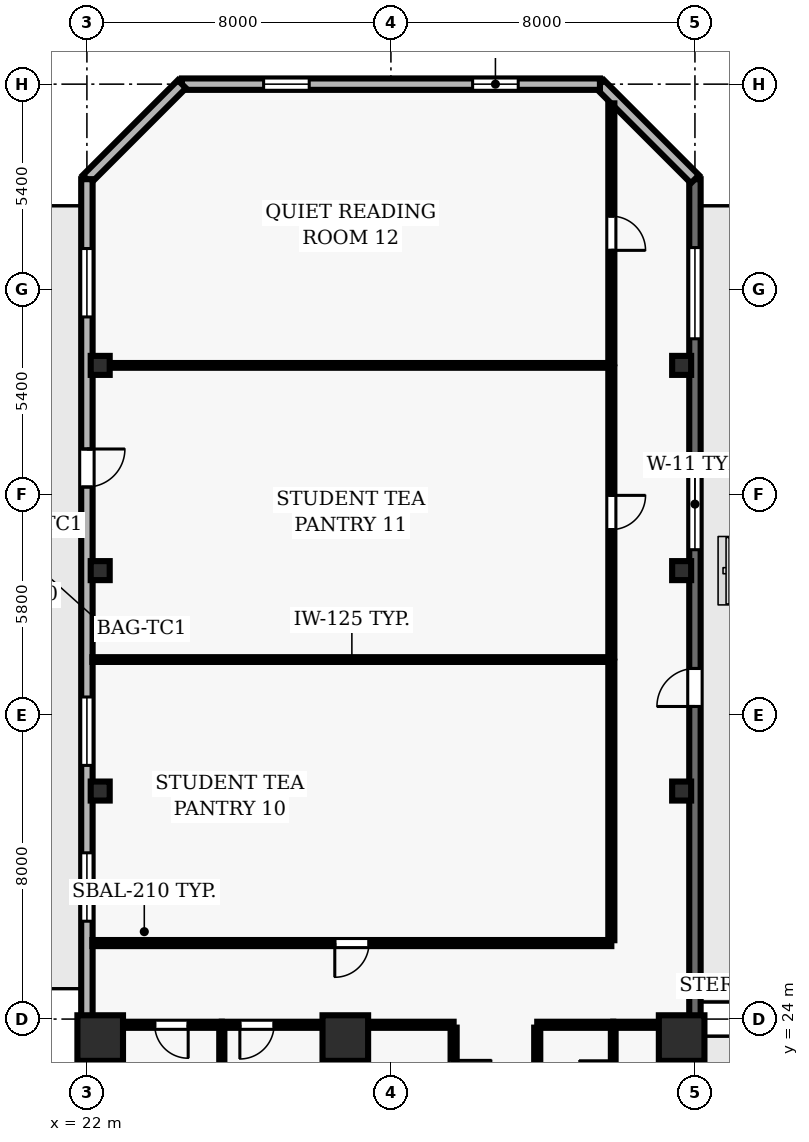
"""IFC4 building model, lengths in metres.
Left out: names, types, materials, properties, quantities, classifications, styles, units other than length and angle.
Written with IfcOpenShell. Run it as: python <this file> out.ifc"""

import sys

from ifc_helpers import new_model, si_unit, direction, frame, frame_2d, origin, origin_2d, place, context, subcontext, project, spatial, rectangle, hollow_rectangle, extrude, element, fill, save


model = new_model("IFC4")
c1 = context("Model", 3, precision=1e-05, world=origin(), true_north=direction((0.0, 1.0)))
c2 = subcontext(c1, "Body", "Model", "MODEL_VIEW")
j1 = project(units=[si_unit("LENGTHUNIT", "METRE"), si_unit("PLANEANGLEUNIT", "RADIAN")], contexts=[c1])
p1 = place(None, origin())
s1 = spatial("IfcSite", under=j1, at=p1, CompositionType="ELEMENT")
p2 = place(p1, origin())
s2 = spatial("IfcBuilding", under=s1, at=p2, CompositionType="ELEMENT")
p3 = place(p2, frame((0.0, 0.0, 158.0)))
s3 = spatial("IfcBuildingStorey", under=s2, at=p3, CompositionType="ELEMENT", Elevation=158.0)
for number, where, z_axis, x_axis in (
    (1, (22.35, 23.5, 0.0), (0.0, 0.0, 1.0), (1.0, 0.0, 0.0)),
    (2, (28.8, 23.5, 0.0), (0.0, 0.0, 1.0), (1.0, 0.0, 0.0)),
    (3, (37.65, 23.5, 0.0), (0.0, 0.0, 1.0), (1.0, 0.0, 0.0)),
):
    element("IfcColumn", number, at=place(p3, frame(where, z_axis=z_axis, x_axis=x_axis)), inside=s3, PredefinedType="COLUMN", context=c2, shape_type="SweptSolid", body=[
        extrude(rectangle(XDim=1.2, YDim=1.2, at=origin_2d()), origin(), (0.0, 0.0, 1.0), 3.9),
    ])
for number, where, z_axis, x_axis in (
    (4, (22.35, 30.0, 0.0), (0.0, 0.0, 1.0), (1.0, 0.0, 0.0)),
    (5, (37.65, 30.0, 0.0), (0.0, 0.0, 1.0), (1.0, 0.0, 0.0)),
    (6, (22.35, 35.8, 0.0), (0.0, 0.0, 1.0), (1.0, 0.0, 0.0)),
    (7, (37.65, 35.8, 0.0), (0.0, 0.0, 1.0), (1.0, 0.0, 0.0)),
    (8, (22.35, 41.2, 0.0), (0.0, 0.0, 1.0), (1.0, 0.0, 0.0)),
    (9, (37.65, 41.2, 0.0), (0.0, 0.0, 1.0), (1.0, 0.0, 0.0)),
):
    element("IfcColumn", number, at=place(p3, frame(where, z_axis=z_axis, x_axis=x_axis)), inside=s3, PredefinedType="COLUMN", context=c2, shape_type="SweptSolid", body=[
        extrude(hollow_rectangle(XDim=0.5, YDim=0.5, WallThickness=0.025, at=origin_2d()), origin(), (0.0, 0.0, 1.0), 3.9),
    ])
p4 = place(p3, frame((38.0, 22.1, 0.0), z_axis=(0.0, 0.0, 1.0), x_axis=(0.0, 1.0, 0.0)))
e10 = element("IfcWall", 10, at=p4, inside=s3, PredefinedType="SOLIDWALL", context=c2, shape_type="SweptSolid", body=[
    extrude(rectangle(XDim=24.0, YDim=0.3, at=frame_2d((12.0, 0.0))), origin(), (0.0, 0.0, 1.0), 3.69),
])
p5 = place(p4, frame((10.125, 0.0, 0.0)))
e11 = element("IfcOpeningElement", 11, at=p5, cuts=e10, PredefinedType="OPENING", context=c2, shape_type="SweptSolid", body=[
    extrude(rectangle(XDim=1.0, YDim=2.2, at=frame_2d((0.5, 1.1))), frame((0.0, 0.16, 0.0), z_axis=(0.0, -1.0, 0.0), x_axis=(1.0, 0.0, 0.0)), (0.0, 0.0, 1.0), 0.32),
])
p6 = place(p4, frame((14.25, 0.0, 0.9)))
e12 = element("IfcOpeningElement", 12, at=p6, cuts=e10, PredefinedType="OPENING", context=c2, shape_type="SweptSolid", body=[
    extrude(rectangle(XDim=2.4, YDim=2.2, at=frame_2d((1.2, 1.1))), frame((0.0, 0.16, 0.0), z_axis=(0.0, -1.0, 0.0), x_axis=(1.0, 0.0, 0.0)), (0.0, 0.0, 1.0), 0.32),
])
p7 = place(p4, frame((19.8, 0.0, 0.9)))
e13 = element("IfcOpeningElement", 13, at=p7, cuts=e10, PredefinedType="OPENING", context=c2, shape_type="SweptSolid", body=[
    extrude(rectangle(XDim=2.4, YDim=2.2, at=frame_2d((1.2, 1.1))), frame((0.0, 0.16, 0.0), z_axis=(0.0, -1.0, 0.0), x_axis=(1.0, 0.0, 0.0)), (0.0, 0.0, 1.0), 0.32),
])
p8 = place(p3, frame((38.0, 46.1, 0.0), z_axis=(0.0, 0.0, 1.0), x_axis=(-0.707106781187, 0.707106781187, 0.0)))
e14 = element("IfcWall", 14, at=p8, inside=s3, PredefinedType="SOLIDWALL", context=c2, shape_type="SweptSolid", body=[
    extrude(rectangle(XDim=3.536, YDim=0.3, at=frame_2d((1.768, 0.0))), origin(), (0.0, 0.0, 1.0), 3.69),
])
p9 = place(p3, frame((35.5, 48.6, 0.0), z_axis=(0.0, 0.0, 1.0), x_axis=(-1.0, 0.0, 0.0)))
e15 = element("IfcWall", 15, at=p9, inside=s3, PredefinedType="SOLIDWALL", context=c2, shape_type="SweptSolid", body=[
    extrude(rectangle(XDim=11.0, YDim=0.3, at=frame_2d((5.5, 0.0))), origin(), (0.0, 0.0, 1.0), 3.69),
])
p10 = place(p9, frame((2.15, 0.0, 0.9)))
e16 = element("IfcOpeningElement", 16, at=p10, cuts=e15, PredefinedType="OPENING", context=c2, shape_type="SweptSolid", body=[
    extrude(rectangle(XDim=1.2, YDim=1.6, at=frame_2d((0.6, 0.8))), frame((0.0, 0.16, 0.0), z_axis=(0.0, -1.0, 0.0), x_axis=(1.0, 0.0, 0.0)), (0.0, 0.0, 1.0), 0.32),
])
p11 = place(p9, frame((7.65, 0.0, 0.9)))
e17 = element("IfcOpeningElement", 17, at=p11, cuts=e15, PredefinedType="OPENING", context=c2, shape_type="SweptSolid", body=[
    extrude(rectangle(XDim=1.2, YDim=1.6, at=frame_2d((0.6, 0.8))), frame((0.0, 0.16, 0.0), z_axis=(0.0, -1.0, 0.0), x_axis=(1.0, 0.0, 0.0)), (0.0, 0.0, 1.0), 0.32),
])
p12 = place(p3, frame((24.5, 48.6, 0.0), z_axis=(0.0, 0.0, 1.0), x_axis=(-0.707106781187, -0.707106781187, 0.0)))
e18 = element("IfcWall", 18, at=p12, inside=s3, PredefinedType="SOLIDWALL", context=c2, shape_type="SweptSolid", body=[
    extrude(rectangle(XDim=3.536, YDim=0.3, at=frame_2d((1.768, 0.0))), origin(), (0.0, 0.0, 1.0), 3.69),
])
p13 = place(p3, frame((22.0, 46.1, 0.0), z_axis=(0.0, 0.0, 1.0), x_axis=(0.0, -1.0, 0.0)))
e19 = element("IfcWall", 19, at=p13, inside=s3, PredefinedType="SOLIDWALL", context=c2, shape_type="SweptSolid", body=[
    extrude(rectangle(XDim=43.6, YDim=0.3, at=frame_2d((21.8, 0.0))), origin(), (0.0, 0.0, 1.0), 3.69),
])
p14 = place(p13, frame((7.1, 0.0, 0.0)))
e20 = element("IfcOpeningElement", 20, at=p14, cuts=e19, PredefinedType="OPENING", context=c2, shape_type="SweptSolid", body=[
    extrude(rectangle(XDim=1.0, YDim=2.2, at=frame_2d((0.5, 1.1))), frame((0.0, 0.16, 0.0), z_axis=(0.0, -1.0, 0.0), x_axis=(1.0, 0.0, 0.0)), (0.0, 0.0, 1.0), 0.32),
])
p15 = place(p13, frame((1.825, 0.0, 0.9)))
e21 = element("IfcOpeningElement", 21, at=p15, cuts=e19, PredefinedType="OPENING", context=c2, shape_type="SweptSolid", body=[
    extrude(rectangle(XDim=1.8, YDim=1.6, at=frame_2d((0.9, 0.8))), frame((0.0, 0.16, 0.0), z_axis=(0.0, -1.0, 0.0), x_axis=(1.0, 0.0, 0.0)), (0.0, 0.0, 1.0), 0.32),
])
p16 = place(p13, frame((13.625, 0.0, 0.9)))
e22 = element("IfcOpeningElement", 22, at=p16, cuts=e19, PredefinedType="OPENING", context=c2, shape_type="SweptSolid", body=[
    extrude(rectangle(XDim=1.8, YDim=1.6, at=frame_2d((0.9, 0.8))), frame((0.0, 0.16, 0.0), z_axis=(0.0, -1.0, 0.0), x_axis=(1.0, 0.0, 0.0)), (0.0, 0.0, 1.0), 0.32),
])
p17 = place(p13, frame((17.725, 0.0, 0.9)))
e23 = element("IfcOpeningElement", 23, at=p17, cuts=e19, PredefinedType="OPENING", context=c2, shape_type="SweptSolid", body=[
    extrude(rectangle(XDim=1.8, YDim=1.6, at=frame_2d((0.9, 0.8))), frame((0.0, 0.16, 0.0), z_axis=(0.0, -1.0, 0.0), x_axis=(1.0, 0.0, 0.0)), (0.0, 0.0, 1.0), 0.32),
])
p18 = place(p13, frame((23.625, 0.0, 0.9)))
e24 = element("IfcOpeningElement", 24, at=p18, cuts=e19, PredefinedType="OPENING", context=c2, shape_type="SweptSolid", body=[
    extrude(rectangle(XDim=1.8, YDim=1.6, at=frame_2d((0.9, 0.8))), frame((0.0, 0.16, 0.0), z_axis=(0.0, -1.0, 0.0), x_axis=(1.0, 0.0, 0.0)), (0.0, 0.0, 1.0), 0.32),
])
p19 = place(p13, frame((28.625, 0.0, 0.9)))
e25 = element("IfcOpeningElement", 25, at=p19, cuts=e19, PredefinedType="OPENING", context=c2, shape_type="SweptSolid", body=[
    extrude(rectangle(XDim=1.8, YDim=1.6, at=frame_2d((0.9, 0.8))), frame((0.0, 0.16, 0.0), z_axis=(0.0, -1.0, 0.0), x_axis=(1.0, 0.0, 0.0)), (0.0, 0.0, 1.0), 0.32),
])
p20 = place(p13, frame((34.525, 0.0, 0.9)))
e26 = element("IfcOpeningElement", 26, at=p20, cuts=e19, PredefinedType="OPENING", context=c2, shape_type="SweptSolid", body=[
    extrude(rectangle(XDim=1.8, YDim=1.6, at=frame_2d((0.9, 0.8))), frame((0.0, 0.16, 0.0), z_axis=(0.0, -1.0, 0.0), x_axis=(1.0, 0.0, 0.0)), (0.0, 0.0, 1.0), 0.32),
])
p21 = place(p3, frame((25.55, 23.85, 0.0), z_axis=(0.0, 0.0, 1.0), x_axis=(-1.0, 0.0, 0.0)))
e27 = element("IfcWall", 27, at=p21, inside=s3, PredefinedType="PARTITIONING", context=c2, shape_type="SweptSolid", body=[
    extrude(rectangle(XDim=3.35, YDim=0.16, at=frame_2d((1.675, 0.0))), origin(), (0.0, 0.0, 1.0), 3.074),
])
p22 = place(p21, frame((0.885, 0.0, 0.0)))
e28 = element("IfcOpeningElement", 28, at=p22, cuts=e27, PredefinedType="OPENING", context=c2, shape_type="SweptSolid", body=[
    extrude(rectangle(XDim=0.88, YDim=2.1, at=frame_2d((0.44, 1.05))), frame((0.0, 0.09, 0.0), z_axis=(0.0, -1.0, 0.0), x_axis=(1.0, 0.0, 0.0)), (0.0, 0.0, 1.0), 0.18),
])
p23 = place(p3, frame((28.8, 23.85, 0.0), z_axis=(0.0, 0.0, 1.0), x_axis=(-1.0, 0.0, 0.0)))
e29 = element("IfcWall", 29, at=p23, inside=s3, PredefinedType="PARTITIONING", context=c2, shape_type="SweptSolid", body=[
    extrude(rectangle(XDim=3.25, YDim=0.16, at=frame_2d((1.625, 0.0))), origin(), (0.0, 0.0, 1.0), 3.074),
])
p24 = place(p23, frame((1.875, 0.0, 0.0)))
e30 = element("IfcOpeningElement", 30, at=p24, cuts=e29, PredefinedType="OPENING", context=c2, shape_type="SweptSolid", body=[
    extrude(rectangle(XDim=0.9, YDim=2.1, at=frame_2d((0.45, 1.05))), frame((0.0, 0.09, 0.0), z_axis=(0.0, -1.0, 0.0), x_axis=(1.0, 0.0, 0.0)), (0.0, 0.0, 1.0), 0.18),
])
p25 = place(p3, frame((31.65, 23.85, 0.0), z_axis=(0.0, 0.0, 1.0), x_axis=(-1.0, 0.0, 0.0)))
e31 = element("IfcWall", 31, at=p25, inside=s3, PredefinedType="PARTITIONING", context=c2, shape_type="SweptSolid", body=[
    extrude(rectangle(XDim=2.85, YDim=0.16, at=frame_2d((1.425, 0.0))), origin(), (0.0, 0.0, 1.0), 3.074),
])
p26 = place(p3, frame((35.8, 26.0, 0.0), z_axis=(0.0, 0.0, 1.0), x_axis=(-1.0, 0.0, 0.0)))
e32 = element("IfcWall", 32, at=p26, inside=s3, PredefinedType="PARTITIONING", context=c2, shape_type="SweptSolid", body=[
    extrude(rectangle(XDim=13.655, YDim=0.16, at=frame_2d((6.828, 0.0))), origin(), (0.0, 0.0, 1.0), 3.69),
])
p27 = place(p26, frame((6.377, 0.0, 0.0)))
e33 = element("IfcOpeningElement", 33, at=p27, cuts=e32, PredefinedType="OPENING", context=c2, shape_type="SweptSolid", body=[
    extrude(rectangle(XDim=0.9, YDim=2.1, at=frame_2d((0.45, 1.05))), frame((0.0, 0.09, 0.0), z_axis=(0.0, -1.0, 0.0), x_axis=(1.0, 0.0, 0.0)), (0.0, 0.0, 1.0), 0.18),
])
p28 = place(p3, frame((35.8, 33.46, 0.0), z_axis=(0.0, 0.0, 1.0), x_axis=(-1.0, 0.0, 0.0)))
e34 = element("IfcWall", 34, at=p28, inside=s3, PredefinedType="PARTITIONING", context=c2, shape_type="SweptSolid", body=[
    extrude(rectangle(XDim=13.655, YDim=0.125, at=frame_2d((6.828, 0.0))), origin(), (0.0, 0.0, 1.0), 3.69),
])
p29 = place(p3, frame((35.8, 41.2, 0.0), z_axis=(0.0, 0.0, 1.0), x_axis=(-1.0, 0.0, 0.0)))
e35 = element("IfcWall", 35, at=p29, inside=s3, PredefinedType="PARTITIONING", context=c2, shape_type="SweptSolid", body=[
    extrude(rectangle(XDim=13.655, YDim=0.125, at=frame_2d((6.828, 0.0))), origin(), (0.0, 0.0, 1.0), 3.074),
])
for number, where, z_axis, x_axis in (
    (36, (35.85, 23.85, 0.0), (0.0, 0.0, 1.0), (-1.0, 0.0, 0.0)),
    (37, (37.85, 23.85, 0.0), (0.0, 0.0, 1.0), (-1.0, 0.0, 0.0)),
):
    element("IfcWall", number, at=place(p3, frame(where, z_axis=z_axis, x_axis=x_axis)), inside=s3, PredefinedType="PARTITIONING", context=c2, shape_type="SweptSolid", body=[
        extrude(rectangle(XDim=2.0, YDim=0.16, at=frame_2d((1.0, 0.0))), origin(), (0.0, 0.0, 1.0), 3.074),
    ])
p30 = place(p3, frame((25.55, 19.16, 0.0), z_axis=(0.0, 0.0, 1.0), x_axis=(0.0, 1.0, 0.0)))
e38 = element("IfcWall", 38, at=p30, inside=s3, PredefinedType="PARTITIONING", context=c2, shape_type="SweptSolid", body=[
    extrude(rectangle(XDim=4.615, YDim=0.135, at=frame_2d((2.308, 0.0))), origin(), (0.0, 0.0, 1.0), 3.69),
])
p31 = place(p3, frame((28.8, 23.775, 0.0), z_axis=(0.0, 0.0, 1.0), x_axis=(0.0, -1.0, 0.0)))
e39 = element("IfcWall", 39, at=p31, inside=s3, PredefinedType="PARTITIONING", context=c2, shape_type="SweptSolid", body=[
    extrude(rectangle(XDim=2.725, YDim=0.125, at=frame_2d((1.362, 0.0))), origin(), (0.0, 0.0, 1.0), 3.69),
])
p32 = place(p3, frame((31.65, 23.775, 0.0), z_axis=(0.0, 0.0, 1.0), x_axis=(0.0, -1.0, 0.0)))
e40 = element("IfcWall", 40, at=p32, inside=s3, PredefinedType="PARTITIONING", context=c2, shape_type="SweptSolid", body=[
    extrude(rectangle(XDim=2.725, YDim=0.16, at=frame_2d((1.362, 0.0))), origin(), (0.0, 0.0, 1.0), 3.69),
])
p33 = place(p32, frame((0.862, 0.0, 0.0)))
e41 = element("IfcOpeningElement", 41, at=p33, cuts=e40, PredefinedType="OPENING", context=c2, shape_type="SweptSolid", body=[
    extrude(rectangle(XDim=1.0, YDim=2.1, at=frame_2d((0.5, 1.05))), frame((0.0, 0.09, 0.0), z_axis=(0.0, -1.0, 0.0), x_axis=(1.0, 0.0, 0.0)), (0.0, 0.0, 1.0), 0.18),
])
p34 = place(p3, frame((33.85, 21.025, 0.0), z_axis=(0.0, 0.0, 1.0), x_axis=(0.0, 1.0, 0.0)))
e42 = element("IfcWall", 42, at=p34, inside=s3, PredefinedType="PARTITIONING", context=c2, shape_type="SweptSolid", body=[
    extrude(rectangle(XDim=2.75, YDim=0.16, at=frame_2d((1.375, 0.0))), origin(), (0.0, 0.0, 1.0), 3.69),
])
p35 = place(p34, frame((0.925, 0.0, 0.0)))
e43 = element("IfcOpeningElement", 43, at=p35, cuts=e42, PredefinedType="OPENING", context=c2, shape_type="SweptSolid", body=[
    extrude(rectangle(XDim=0.9, YDim=2.1, at=frame_2d((0.45, 1.05))), frame((0.0, 0.09, 0.0), z_axis=(0.0, -1.0, 0.0), x_axis=(1.0, 0.0, 0.0)), (0.0, 0.0, 1.0), 0.18),
])
p36 = place(p3, frame((35.8, 33.403, 0.0), z_axis=(0.0, 0.0, 1.0), x_axis=(0.0, -1.0, 0.0)))
e44 = element("IfcWall", 44, at=p36, inside=s3, PredefinedType="PARTITIONING", context=c2, shape_type="SweptSolid", body=[
    extrude(rectangle(XDim=7.328, YDim=0.16, at=frame_2d((3.664, 0.0))), origin(), (0.0, 0.0, 1.0), 3.69),
])
p37 = place(p3, frame((35.8, 41.143, 0.0), z_axis=(0.0, 0.0, 1.0), x_axis=(0.0, -1.0, 0.0)))
e45 = element("IfcWall", 45, at=p37, inside=s3, PredefinedType="PARTITIONING", context=c2, shape_type="SweptSolid", body=[
    extrude(rectangle(XDim=7.626, YDim=0.16, at=frame_2d((3.813, 0.0))), origin(), (0.0, 0.0, 1.0), 3.69),
])
p38 = place(p37, frame((3.363, 0.0, 0.0)))
e46 = element("IfcOpeningElement", 46, at=p38, cuts=e45, PredefinedType="OPENING", context=c2, shape_type="SweptSolid", body=[
    extrude(rectangle(XDim=0.9, YDim=2.1, at=frame_2d((0.45, 1.05))), frame((0.0, 0.09, 0.0), z_axis=(0.0, -1.0, 0.0), x_axis=(1.0, 0.0, 0.0)), (0.0, 0.0, 1.0), 0.18),
])
p39 = place(p3, frame((35.8, 48.095, 0.0), z_axis=(0.0, 0.0, 1.0), x_axis=(0.0, -1.0, 0.0)))
e47 = element("IfcWall", 47, at=p39, inside=s3, PredefinedType="PARTITIONING", context=c2, shape_type="SweptSolid", body=[
    extrude(rectangle(XDim=6.837, YDim=0.16, at=frame_2d((3.418, 0.0))), origin(), (0.0, 0.0, 1.0), 3.69),
])
p40 = place(p39, frame((2.968, 0.0, 0.0)))
e48 = element("IfcOpeningElement", 48, at=p40, cuts=e47, PredefinedType="OPENING", context=c2, shape_type="SweptSolid", body=[
    extrude(rectangle(XDim=0.9, YDim=2.1, at=frame_2d((0.45, 1.05))), frame((0.0, 0.09, 0.0), z_axis=(0.0, -1.0, 0.0), x_axis=(1.0, 0.0, 0.0)), (0.0, 0.0, 1.0), 0.18),
])
p41 = place(p3, frame((35.85, 21.13, 0.0), z_axis=(0.0, 0.0, 1.0), x_axis=(0.0, 1.0, 0.0)))
e49 = element("IfcWall", 49, at=p41, inside=s3, PredefinedType="PARTITIONING", context=c2, shape_type="SweptSolid", body=[
    extrude(rectangle(XDim=2.645, YDim=0.125, at=frame_2d((1.323, 0.0))), origin(), (0.0, 0.0, 1.0), 3.69),
])
p42 = place(p41, frame((0.872, 0.0, 0.0)))
e50 = element("IfcOpeningElement", 50, at=p42, cuts=e49, PredefinedType="OPENING", context=c2, shape_type="SweptSolid", body=[
    extrude(rectangle(XDim=0.9, YDim=2.1, at=frame_2d((0.45, 1.05))), frame((0.0, 0.073, 0.0), z_axis=(0.0, -1.0, 0.0), x_axis=(1.0, 0.0, 0.0)), (0.0, 0.0, 1.0), 0.145),
])
p43 = place(p5, origin())
e51 = element("IfcDoor", 51, at=p43, inside=s3, OperationType="SINGLE_SWING_LEFT", PredefinedType="DOOR", context=c2, shape_type="SweptSolid", body=[
    extrude(rectangle(XDim=1.0, YDim=2.2, at=frame_2d((0.5, 1.1))), frame((0.0, 0.025, 0.0), z_axis=(0.0, -1.0, 0.0), x_axis=(1.0, 0.0, 0.0)), (0.0, 0.0, 1.0), 0.05),
])
fill(e11, e51)
p44 = place(p6, origin())
e52 = element("IfcWindow", 52, at=p44, inside=s3, PartitioningType="SINGLE_PANEL", PredefinedType="WINDOW", context=c2, shape_type="SweptSolid", body=[
    extrude(rectangle(XDim=2.4, YDim=2.2, at=frame_2d((1.2, 1.1))), frame((0.0, 0.03, 0.0), z_axis=(0.0, -1.0, 0.0), x_axis=(1.0, 0.0, 0.0)), (0.0, 0.0, 1.0), 0.06),
])
fill(e12, e52)
p45 = place(p7, origin())
e53 = element("IfcWindow", 53, at=p45, inside=s3, PartitioningType="SINGLE_PANEL", PredefinedType="WINDOW", context=c2, shape_type="SweptSolid", body=[
    extrude(rectangle(XDim=2.4, YDim=2.2, at=frame_2d((1.2, 1.1))), frame((0.0, 0.03, 0.0), z_axis=(0.0, -1.0, 0.0), x_axis=(1.0, 0.0, 0.0)), (0.0, 0.0, 1.0), 0.06),
])
fill(e13, e53)
p46 = place(p10, origin())
e54 = element("IfcWindow", 54, at=p46, inside=s3, PartitioningType="SINGLE_PANEL", PredefinedType="WINDOW", context=c2, shape_type="SweptSolid", body=[
    extrude(rectangle(XDim=1.2, YDim=1.6, at=frame_2d((0.6, 0.8))), frame((0.0, 0.03, 0.0), z_axis=(0.0, -1.0, 0.0), x_axis=(1.0, 0.0, 0.0)), (0.0, 0.0, 1.0), 0.06),
])
fill(e16, e54)
p47 = place(p11, origin())
e55 = element("IfcWindow", 55, at=p47, inside=s3, PartitioningType="SINGLE_PANEL", PredefinedType="WINDOW", context=c2, shape_type="SweptSolid", body=[
    extrude(rectangle(XDim=1.2, YDim=1.6, at=frame_2d((0.6, 0.8))), frame((0.0, 0.03, 0.0), z_axis=(0.0, -1.0, 0.0), x_axis=(1.0, 0.0, 0.0)), (0.0, 0.0, 1.0), 0.06),
])
fill(e17, e55)
p48 = place(p14, origin())
e56 = element("IfcDoor", 56, at=p48, inside=s3, OperationType="SINGLE_SWING_LEFT", PredefinedType="DOOR", context=c2, shape_type="SweptSolid", body=[
    extrude(rectangle(XDim=1.0, YDim=2.2, at=frame_2d((0.5, 1.1))), frame((0.0, 0.025, 0.0), z_axis=(0.0, -1.0, 0.0), x_axis=(1.0, 0.0, 0.0)), (0.0, 0.0, 1.0), 0.05),
])
fill(e20, e56)
p49 = place(p15, origin())
e57 = element("IfcWindow", 57, at=p49, inside=s3, PartitioningType="SINGLE_PANEL", PredefinedType="WINDOW", context=c2, shape_type="SweptSolid", body=[
    extrude(rectangle(XDim=1.8, YDim=1.6, at=frame_2d((0.9, 0.8))), frame((0.0, 0.03, 0.0), z_axis=(0.0, -1.0, 0.0), x_axis=(1.0, 0.0, 0.0)), (0.0, 0.0, 1.0), 0.06),
])
fill(e21, e57)
p50 = place(p16, origin())
e58 = element("IfcWindow", 58, at=p50, inside=s3, PartitioningType="SINGLE_PANEL", PredefinedType="WINDOW", context=c2, shape_type="SweptSolid", body=[
    extrude(rectangle(XDim=1.8, YDim=1.6, at=frame_2d((0.9, 0.8))), frame((0.0, 0.03, 0.0), z_axis=(0.0, -1.0, 0.0), x_axis=(1.0, 0.0, 0.0)), (0.0, 0.0, 1.0), 0.06),
])
fill(e22, e58)
p51 = place(p17, origin())
e59 = element("IfcWindow", 59, at=p51, inside=s3, PartitioningType="SINGLE_PANEL", PredefinedType="WINDOW", context=c2, shape_type="SweptSolid", body=[
    extrude(rectangle(XDim=1.8, YDim=1.6, at=frame_2d((0.9, 0.8))), frame((0.0, 0.03, 0.0), z_axis=(0.0, -1.0, 0.0), x_axis=(1.0, 0.0, 0.0)), (0.0, 0.0, 1.0), 0.06),
])
fill(e23, e59)
p52 = place(p42, origin())
e60 = element("IfcDoor", 60, at=p52, inside=s3, OperationType="SINGLE_SWING_RIGHT", PredefinedType="DOOR", context=c2, shape_type="SweptSolid", body=[
    extrude(rectangle(XDim=0.9, YDim=2.1, at=frame_2d((0.45, 1.05))), frame((0.0, 0.025, 0.0), z_axis=(0.0, -1.0, 0.0), x_axis=(1.0, 0.0, 0.0)), (0.0, 0.0, 1.0), 0.05),
])
fill(e50, e60)
p53 = place(p33, origin())
e61 = element("IfcDoor", 61, at=p53, inside=s3, OperationType="SINGLE_SWING_LEFT", PredefinedType="DOOR", context=c2, shape_type="SweptSolid", body=[
    extrude(rectangle(XDim=1.0, YDim=2.1, at=frame_2d((0.5, 1.05))), frame((0.0, 0.025, 0.0), z_axis=(0.0, -1.0, 0.0), x_axis=(1.0, 0.0, 0.0)), (0.0, 0.0, 1.0), 0.05),
])
fill(e41, e61)
p54 = place(p22, origin())
e62 = element("IfcDoor", 62, at=p54, inside=s3, OperationType="SINGLE_SWING_LEFT", PredefinedType="DOOR", context=c2, shape_type="SweptSolid", body=[
    extrude(rectangle(XDim=0.88, YDim=2.1, at=frame_2d((0.44, 1.05))), frame((0.0, 0.025, 0.0), z_axis=(0.0, -1.0, 0.0), x_axis=(1.0, 0.0, 0.0)), (0.0, 0.0, 1.0), 0.05),
])
fill(e28, e62)
p55 = place(p24, origin())
e63 = element("IfcDoor", 63, at=p55, inside=s3, OperationType="SINGLE_SWING_RIGHT", PredefinedType="DOOR", context=c2, shape_type="SweptSolid", body=[
    extrude(rectangle(XDim=0.9, YDim=2.1, at=frame_2d((0.45, 1.05))), frame((0.0, 0.025, 0.0), z_axis=(0.0, -1.0, 0.0), x_axis=(1.0, 0.0, 0.0)), (0.0, 0.0, 1.0), 0.05),
])
fill(e30, e63)
p56 = place(p27, origin())
e64 = element("IfcDoor", 64, at=p56, inside=s3, OperationType="SINGLE_SWING_RIGHT", PredefinedType="DOOR", context=c2, shape_type="SweptSolid", body=[
    extrude(rectangle(XDim=0.9, YDim=2.1, at=frame_2d((0.45, 1.05))), frame((0.0, 0.025, 0.0), z_axis=(0.0, -1.0, 0.0), x_axis=(1.0, 0.0, 0.0)), (0.0, 0.0, 1.0), 0.05),
])
fill(e33, e64)
p57 = place(p38, origin())
e65 = element("IfcDoor", 65, at=p57, inside=s3, OperationType="SINGLE_SWING_LEFT", PredefinedType="DOOR", context=c2, shape_type="SweptSolid", body=[
    extrude(rectangle(XDim=0.9, YDim=2.1, at=frame_2d((0.45, 1.05))), frame((0.0, 0.025, 0.0), z_axis=(0.0, -1.0, 0.0), x_axis=(1.0, 0.0, 0.0)), (0.0, 0.0, 1.0), 0.05),
])
fill(e46, e65)
p58 = place(p40, origin())
e66 = element("IfcDoor", 66, at=p58, inside=s3, OperationType="SINGLE_SWING_RIGHT", PredefinedType="DOOR", context=c2, shape_type="SweptSolid", body=[
    extrude(rectangle(XDim=0.9, YDim=2.1, at=frame_2d((0.45, 1.05))), frame((0.0, 0.025, 0.0), z_axis=(0.0, -1.0, 0.0), x_axis=(1.0, 0.0, 0.0)), (0.0, 0.0, 1.0), 0.05),
])
fill(e48, e66)
save(model, sys.argv[1])
